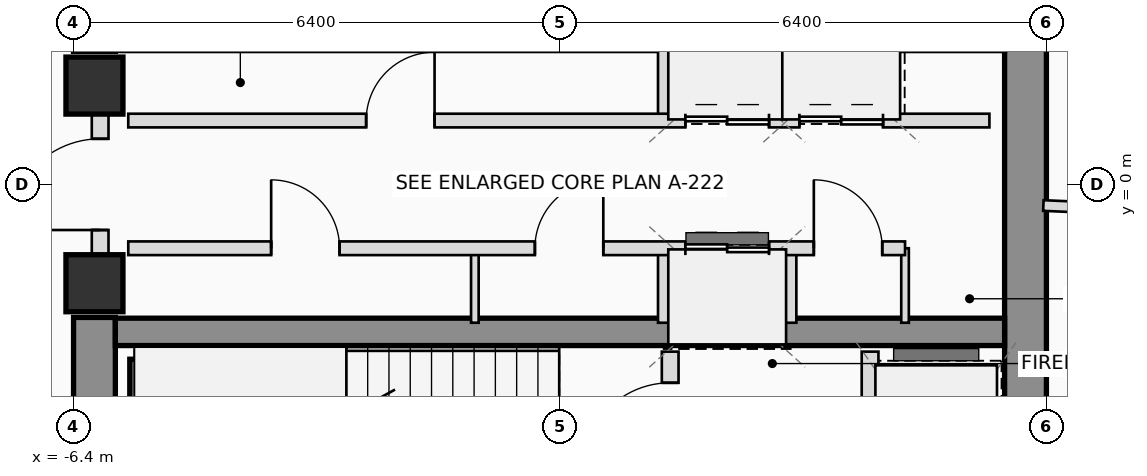
"""IFC4 building model, lengths in metres.
Left out: names, types, materials, properties, quantities, classifications, styles, units other than length and angle.
Written with IfcOpenShell. Run it as: python <this file> out.ifc"""

import sys

from ifc_helpers import new_model, si_unit, direction, frame, frame_2d, origin, origin_2d, place, context, subcontext, project, spatial, rectangle, extrude, source, transform, mapped, element, fill, save


model = new_model("IFC4")
c1 = context("Model", 3, precision=1e-05, world=origin(), true_north=direction((0.0, 1.0)))
c2 = subcontext(c1, "Body", "Model", "MODEL_VIEW")
j1 = project(units=[si_unit("LENGTHUNIT", "METRE"), si_unit("PLANEANGLEUNIT", "RADIAN")], contexts=[c1])
p1 = place(None, origin())
s1 = spatial("IfcSite", under=j1, at=p1, CompositionType="ELEMENT")
p2 = place(p1, origin())
s2 = spatial("IfcBuilding", under=s1, at=p2, CompositionType="ELEMENT")
p3 = place(p2, frame((0.0, 0.0, 235.45)))
s3 = spatial("IfcBuildingStorey", under=s2, at=p3, CompositionType="ELEMENT", Elevation=235.45)
p4 = place(p3, frame((6.125, -5.3, 0.0), z_axis=(0.0, 0.0, 1.0), x_axis=(0.0, 1.0, 0.0)))
e1 = element("IfcWall", 1, at=p4, inside=s3, PredefinedType="SHEAR", context=c2, shape_type="SweptSolid", body=[
    extrude(rectangle(XDim=10.6, YDim=0.55, at=frame_2d((5.3, 0.0))), origin(), (0.0, 0.0, 1.0), 3.4),
])
p5 = place(p3, frame((-6.125, -5.3, 0.0), z_axis=(0.0, 0.0, 1.0), x_axis=(0.0, 1.0, 0.0)))
e2 = element("IfcWall", 2, at=p5, inside=s3, PredefinedType="SHEAR", context=c2, shape_type="SweptSolid", body=[
    extrude(rectangle(XDim=3.55, YDim=0.55, at=frame_2d((1.775, 0.0))), origin(), (0.0, 0.0, 1.0), 3.4),
])
p6 = place(p3, frame((-5.85, -1.94, 0.0), z_axis=(0.0, 0.0, 1.0), x_axis=(1.0, 0.0, 0.0)))
e3 = element("IfcWall", 3, at=p6, inside=s3, PredefinedType="SHEAR", context=c2, shape_type="SweptSolid", body=[
    extrude(rectangle(XDim=11.7, YDim=0.36, at=frame_2d((5.85, 0.0))), origin(), (0.0, 0.0, 1.0), 3.4),
])
p7 = place(p3, frame((-5.52, -5.05, 0.0), z_axis=(0.0, 0.0, 1.0), x_axis=(0.0, 1.0, 0.0)))
e4 = element("IfcWall", 4, at=p7, inside=s3, PredefinedType="SHEAR", context=c2, shape_type="SweptSolid", body=[
    extrude(rectangle(XDim=2.75, YDim=0.28, at=frame_2d((1.375, 0.0))), origin(), (0.0, 0.0, 1.0), 3.4),
])
m1 = source(origin(), c2, "Body", "SweptSolid", [
    extrude(rectangle(XDim=0.75, YDim=0.75, at=origin_2d()), origin(), (0.0, 0.0, 1.0), 3.4),
])
for number, where, z_axis, x_axis in (
    (5, (-6.125, -1.3, 0.0), (0.0, 0.0, 1.0), (1.0, 0.0, 0.0)),
    (6, (-6.125, 1.3, 0.0), (0.0, 0.0, 1.0), (1.0, 0.0, 0.0)),
):
    element("IfcColumn", number, at=place(p3, frame(where, z_axis=z_axis, x_axis=x_axis)), inside=s3, PredefinedType="COLUMN", context=c2, shape_type="MappedRepresentation", body=[
        mapped(m1, transform((0.0, 0.0, 0.0), scale=1.0)),
    ])
p8 = place(p3, frame((-6.05, -0.95, 0.0), z_axis=(0.0, 0.0, 1.0), x_axis=(0.0, 1.0, 0.0)))
e7 = element("IfcWall", 7, at=p8, inside=s3, PredefinedType="PLUMBINGWALL", context=c2, shape_type="SweptSolid", body=[
    extrude(rectangle(XDim=1.9, YDim=0.22, at=frame_2d((0.95, 0.0))), origin(), (0.0, 0.0, 1.0), 2.18),
])
p9 = place(p8, frame((0.35, 0.0, 0.0)))
e8 = element("IfcOpeningElement", 8, at=p9, cuts=e7, PredefinedType="OPENING", context=c2, shape_type="SweptSolid", body=[
    extrude(rectangle(XDim=1.2, YDim=2.2, at=frame_2d((0.6, 1.1))), frame((0.0, 0.12, 0.0), z_axis=(0.0, -1.0, 0.0), x_axis=(1.0, 0.0, 0.0)), (0.0, 0.0, 1.0), 0.24),
])
p10 = place(p3, frame((1.45, -4.18, 0.0), z_axis=(0.0, 0.0, 1.0), x_axis=(0.0, 1.0, 0.0)))
e9 = element("IfcWall", 9, at=p10, inside=s3, PredefinedType="PLUMBINGWALL", context=c2, shape_type="SweptSolid", body=[
    extrude(rectangle(XDim=1.98, YDim=0.22, at=frame_2d((0.99, 0.0))), origin(), (0.0, 0.0, 1.0), 3.2),
])
p11 = place(p10, frame((0.42, 0.0, 0.0)))
e10 = element("IfcOpeningElement", 10, at=p11, cuts=e9, PredefinedType="OPENING", context=c2, shape_type="SweptSolid", body=[
    extrude(rectangle(XDim=1.15, YDim=2.15, at=frame_2d((0.575, 1.075))), frame((0.0, 0.12, 0.0), z_axis=(0.0, -1.0, 0.0), x_axis=(1.0, 0.0, 0.0)), (0.0, 0.0, 1.0), 0.24),
])
p12 = place(p3, frame((4.08, -5.15, 0.0), z_axis=(0.0, 0.0, 1.0), x_axis=(0.0, 1.0, 0.0)))
e11 = element("IfcWall", 11, at=p12, inside=s3, PredefinedType="PLUMBINGWALL", context=c2, shape_type="SweptSolid", body=[
    extrude(rectangle(XDim=2.95, YDim=0.22, at=frame_2d((1.475, 0.0))), origin(), (0.0, 0.0, 1.0), 3.2),
])
p13 = place(p12, frame((0.95, 0.0, 0.0)))
e12 = element("IfcOpeningElement", 12, at=p13, cuts=e11, PredefinedType="OPENING", context=c2, shape_type="SweptSolid", body=[
    extrude(rectangle(XDim=1.2, YDim=2.25, at=frame_2d((0.6, 1.125))), frame((0.0, 0.12, 0.0), z_axis=(0.0, -1.0, 0.0), x_axis=(1.0, 0.0, 0.0)), (0.0, 0.0, 1.0), 0.24),
])
p14 = place(p3, frame((-1.12, -1.82, 0.0), z_axis=(0.0, 0.0, 1.0), x_axis=(0.0, 1.0, 0.0)))
e13 = element("IfcWall", 13, at=p14, inside=s3, PredefinedType="PARTITIONING", context=c2, shape_type="SweptSolid", body=[
    extrude(rectangle(XDim=0.98, YDim=0.1, at=frame_2d((0.49, 0.0))), origin(), (0.0, 0.0, 1.0), 3.2),
])
for number, where, z_axis, x_axis in (
    (14, (1.38, 0.84, 0.0), (0.0, 0.0, 1.0), (0.0, 1.0, 0.0)),
    (15, (1.38, -1.82, 0.0), (0.0, 0.0, 1.0), (0.0, 1.0, 0.0)),
    (16, (3.02, 0.84, 0.0), (0.0, 0.0, 1.0), (0.0, 1.0, 0.0)),
    (17, (4.38, 0.84, 0.0), (0.0, 0.0, 1.0), (0.0, 1.0, 0.0)),
    (18, (3.02, -1.82, 0.0), (0.0, 0.0, 1.0), (0.0, 1.0, 0.0)),
):
    element("IfcWall", number, at=place(p3, frame(where, z_axis=z_axis, x_axis=x_axis)), inside=s3, PredefinedType="PLUMBINGWALL", context=c2, shape_type="SweptSolid", body=[
        extrude(rectangle(XDim=0.98, YDim=0.18, at=frame_2d((0.49, 0.0))), origin(), (0.0, 0.0, 1.0), 3.2),
    ])
p15 = place(p3, frame((4.54, -1.82, 0.0), z_axis=(0.0, 0.0, 1.0), x_axis=(0.0, 1.0, 0.0)))
e19 = element("IfcWall", 19, at=p15, inside=s3, PredefinedType="PARTITIONING", context=c2, shape_type="SweptSolid", body=[
    extrude(rectangle(XDim=0.98, YDim=0.1, at=frame_2d((0.49, 0.0))), origin(), (0.0, 0.0, 1.0), 3.2),
])
p16 = place(p3, frame((-5.68, 0.84, 0.0), z_axis=(0.0, 0.0, 1.0), x_axis=(1.0, 0.0, 0.0)))
e20 = element("IfcWall", 20, at=p16, inside=s3, PredefinedType="PLUMBINGWALL", context=c2, shape_type="SweptSolid", body=[
    extrude(rectangle(XDim=11.33, YDim=0.18, at=frame_2d((5.665, 0.0))), origin(), (0.0, 0.0, 1.0), 3.2),
])
p17 = place(p16, frame((3.13, 0.0, 0.0)))
e21 = element("IfcOpeningElement", 21, at=p17, cuts=e20, PredefinedType="OPENING", context=c2, shape_type="SweptSolid", body=[
    extrude(rectangle(XDim=0.9, YDim=2.05, at=frame_2d((0.45, 1.025))), frame((0.0, 0.1, 0.0), z_axis=(0.0, -1.0, 0.0), x_axis=(1.0, 0.0, 0.0)), (0.0, 0.0, 1.0), 0.2),
])
p18 = place(p16, frame((7.33, 0.0, 0.0)))
e22 = element("IfcOpeningElement", 22, at=p18, cuts=e20, PredefinedType="OPENING", context=c2, shape_type="SweptSolid", body=[
    extrude(rectangle(XDim=1.1, YDim=2.2, at=frame_2d((0.55, 1.1))), frame((0.0, 0.1, 0.0), z_axis=(0.0, -1.0, 0.0), x_axis=(1.0, 0.0, 0.0)), (0.0, 0.0, 1.0), 0.2),
])
p19 = place(p16, frame((8.83, 0.0, 0.0)))
e23 = element("IfcOpeningElement", 23, at=p19, cuts=e20, PredefinedType="OPENING", context=c2, shape_type="SweptSolid", body=[
    extrude(rectangle(XDim=1.1, YDim=2.2, at=frame_2d((0.55, 1.1))), frame((0.0, 0.1, 0.0), z_axis=(0.0, -1.0, 0.0), x_axis=(1.0, 0.0, 0.0)), (0.0, 0.0, 1.0), 0.2),
])
p20 = place(p3, frame((-5.68, -0.84, 0.0), z_axis=(0.0, 0.0, 1.0), x_axis=(1.0, 0.0, 0.0)))
e24 = element("IfcWall", 24, at=p20, inside=s3, PredefinedType="PLUMBINGWALL", context=c2, shape_type="SweptSolid", body=[
    extrude(rectangle(XDim=10.22, YDim=0.18, at=frame_2d((5.11, 0.0))), origin(), (0.0, 0.0, 1.0), 3.2),
])
p21 = place(p20, frame((1.88, 0.0, 0.0)))
e25 = element("IfcOpeningElement", 25, at=p21, cuts=e24, PredefinedType="OPENING", context=c2, shape_type="SweptSolid", body=[
    extrude(rectangle(XDim=0.9, YDim=2.05, at=frame_2d((0.45, 1.025))), frame((0.0, 0.1, 0.0), z_axis=(0.0, -1.0, 0.0), x_axis=(1.0, 0.0, 0.0)), (0.0, 0.0, 1.0), 0.2),
])
p22 = place(p20, frame((5.35, 0.0, 0.0)))
e26 = element("IfcOpeningElement", 26, at=p22, cuts=e24, PredefinedType="OPENING", context=c2, shape_type="SweptSolid", body=[
    extrude(rectangle(XDim=0.9, YDim=2.05, at=frame_2d((0.45, 1.025))), frame((0.0, 0.1, 0.0), z_axis=(0.0, -1.0, 0.0), x_axis=(1.0, 0.0, 0.0)), (0.0, 0.0, 1.0), 0.2),
])
p23 = place(p20, frame((7.33, 0.0, 0.0)))
e27 = element("IfcOpeningElement", 27, at=p23, cuts=e24, PredefinedType="OPENING", context=c2, shape_type="SweptSolid", body=[
    extrude(rectangle(XDim=1.1, YDim=2.2, at=frame_2d((0.55, 1.1))), frame((0.0, 0.1, 0.0), z_axis=(0.0, -1.0, 0.0), x_axis=(1.0, 0.0, 0.0)), (0.0, 0.0, 1.0), 0.2),
])
p24 = place(p20, frame((9.02, 0.0, 0.0)))
e28 = element("IfcOpeningElement", 28, at=p24, cuts=e24, PredefinedType="OPENING", context=c2, shape_type="SweptSolid", body=[
    extrude(rectangle(XDim=0.9, YDim=2.05, at=frame_2d((0.45, 1.025))), frame((0.0, 0.1, 0.0), z_axis=(0.0, -1.0, 0.0), x_axis=(1.0, 0.0, 0.0)), (0.0, 0.0, 1.0), 0.2),
])
p25 = place(p3, frame((6.36, -0.278, 0.0), z_axis=(0.0, 0.0, 1.0), x_axis=(0.99904773846, -0.043630451279, 0.0)))
e29 = element("IfcWall", 29, at=p25, inside=s3, PredefinedType="PARTITIONING", context=c2, shape_type="SweptSolid", body=[
    extrude(rectangle(XDim=8.992, YDim=0.14, at=frame_2d((4.496, 0.0))), origin(), (0.0, 0.0, 1.0), 2.605),
])
p26 = place(p9, origin())
e30 = element("IfcDoor", 30, at=p26, inside=s3, OperationType="SINGLE_SWING_LEFT", PredefinedType="DOOR", context=c2, shape_type="SweptSolid", body=[
    extrude(rectangle(XDim=1.2, YDim=2.2, at=frame_2d((0.6, 1.1))), frame((0.0, 0.025, 0.0), z_axis=(0.0, -1.0, 0.0), x_axis=(1.0, 0.0, 0.0)), (0.0, 0.0, 1.0), 0.05),
])
fill(e8, e30)
p27 = place(p11, origin())
e31 = element("IfcDoor", 31, at=p27, inside=s3, OperationType="SINGLE_SWING_LEFT", PredefinedType="DOOR", context=c2, shape_type="SweptSolid", body=[
    extrude(rectangle(XDim=1.15, YDim=2.15, at=frame_2d((0.575, 1.075))), frame((0.0, 0.025, 0.0), z_axis=(0.0, -1.0, 0.0), x_axis=(1.0, 0.0, 0.0)), (0.0, 0.0, 1.0), 0.05),
])
fill(e10, e31)
p28 = place(p17, origin())
e32 = element("IfcDoor", 32, at=p28, inside=s3, OperationType="SINGLE_SWING_RIGHT", PredefinedType="DOOR", context=c2, shape_type="SweptSolid", body=[
    extrude(rectangle(XDim=0.9, YDim=2.05, at=frame_2d((0.45, 1.025))), frame((0.0, 0.025, 0.0), z_axis=(0.0, -1.0, 0.0), x_axis=(1.0, 0.0, 0.0)), (0.0, 0.0, 1.0), 0.05),
])
fill(e21, e32)
p29 = place(p18, origin())
e33 = element("IfcDoor", 33, at=p29, inside=s3, OperationType="DOUBLE_DOOR_SLIDING", PredefinedType="DOOR", context=c2, shape_type="SweptSolid", body=[
    extrude(rectangle(XDim=1.1, YDim=2.2, at=frame_2d((0.55, 1.1))), frame((0.0, 0.025, 0.0), z_axis=(0.0, -1.0, 0.0), x_axis=(1.0, 0.0, 0.0)), (0.0, 0.0, 1.0), 0.05),
])
fill(e22, e33)
p30 = place(p19, origin())
e34 = element("IfcDoor", 34, at=p30, inside=s3, OperationType="DOUBLE_DOOR_SLIDING", PredefinedType="DOOR", context=c2, shape_type="SweptSolid", body=[
    extrude(rectangle(XDim=1.1, YDim=2.2, at=frame_2d((0.55, 1.1))), frame((0.0, 0.025, 0.0), z_axis=(0.0, -1.0, 0.0), x_axis=(1.0, 0.0, 0.0)), (0.0, 0.0, 1.0), 0.05),
])
fill(e23, e34)
p31 = place(p21, origin())
e35 = element("IfcDoor", 35, at=p31, inside=s3, OperationType="SINGLE_SWING_LEFT", PredefinedType="DOOR", context=c2, shape_type="SweptSolid", body=[
    extrude(rectangle(XDim=0.9, YDim=2.05, at=frame_2d((0.45, 1.025))), frame((0.0, 0.025, 0.0), z_axis=(0.0, -1.0, 0.0), x_axis=(1.0, 0.0, 0.0)), (0.0, 0.0, 1.0), 0.05),
])
fill(e25, e35)
p32 = place(p22, origin())
e36 = element("IfcDoor", 36, at=p32, inside=s3, OperationType="SINGLE_SWING_RIGHT", PredefinedType="DOOR", context=c2, shape_type="SweptSolid", body=[
    extrude(rectangle(XDim=0.9, YDim=2.05, at=frame_2d((0.45, 1.025))), frame((0.0, 0.025, 0.0), z_axis=(0.0, -1.0, 0.0), x_axis=(1.0, 0.0, 0.0)), (0.0, 0.0, 1.0), 0.05),
])
fill(e26, e36)
p33 = place(p23, origin())
e37 = element("IfcDoor", 37, at=p33, inside=s3, OperationType="DOUBLE_DOOR_SLIDING", PredefinedType="DOOR", context=c2, shape_type="SweptSolid", body=[
    extrude(rectangle(XDim=1.1, YDim=2.2, at=frame_2d((0.55, 1.1))), frame((0.0, 0.025, 0.0), z_axis=(0.0, -1.0, 0.0), x_axis=(1.0, 0.0, 0.0)), (0.0, 0.0, 1.0), 0.05),
])
fill(e27, e37)
p34 = place(p24, origin())
e38 = element("IfcDoor", 38, at=p34, inside=s3, OperationType="SINGLE_SWING_LEFT", PredefinedType="DOOR", context=c2, shape_type="SweptSolid", body=[
    extrude(rectangle(XDim=0.9, YDim=2.05, at=frame_2d((0.45, 1.025))), frame((0.0, 0.025, 0.0), z_axis=(0.0, -1.0, 0.0), x_axis=(1.0, 0.0, 0.0)), (0.0, 0.0, 1.0), 0.05),
])
fill(e28, e38)
save(model, sys.argv[1])
